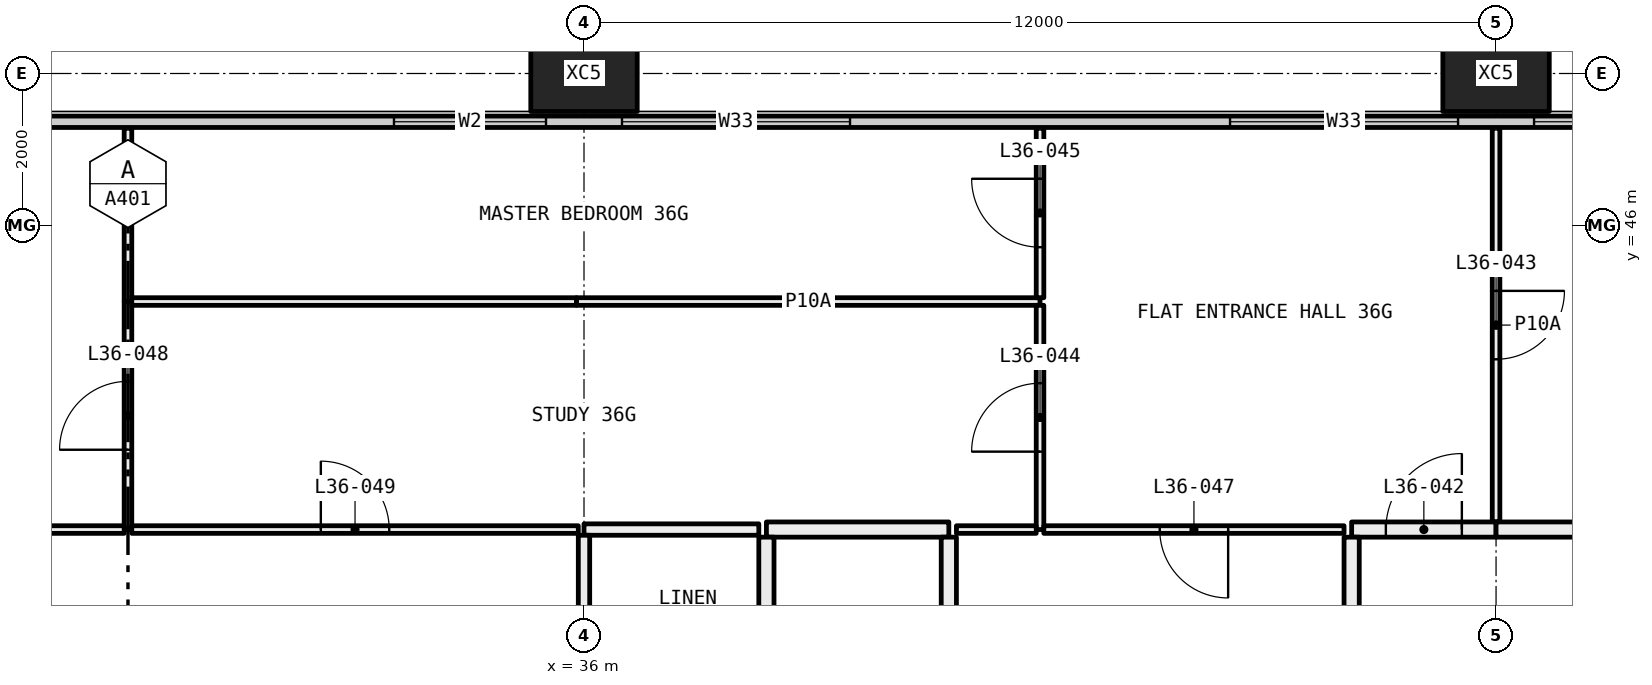
"""IFC4 building model, lengths in metres.
Left out: names, types, materials, properties, quantities, classifications, styles, units other than length and angle.
Written with IfcOpenShell. Run it as: python <this file> out.ifc"""

import sys

from ifc_helpers import new_model, si_unit, direction, frame, frame_2d, origin, origin_2d, place, context, subcontext, project, spatial, rectangle, hollow_rectangle, extrude, element, fill, save


model = new_model("IFC4")
c1 = context("Model", 3, precision=1e-05, world=origin(), true_north=direction((0.0, 1.0)))
c2 = subcontext(c1, "Body", "Model", "MODEL_VIEW")
j1 = project(units=[si_unit("LENGTHUNIT", "METRE"), si_unit("PLANEANGLEUNIT", "RADIAN")], contexts=[c1])
p1 = place(None, origin())
s1 = spatial("IfcSite", under=j1, at=p1, CompositionType="ELEMENT")
p2 = place(p1, origin())
s2 = spatial("IfcBuilding", under=s1, at=p2, CompositionType="ELEMENT")
p3 = place(p2, frame((0.0, 0.0, 138.0)))
s3 = spatial("IfcBuildingStorey", under=s2, at=p3, CompositionType="ELEMENT", Elevation=138.0)
for number, where, z_axis, x_axis in (
    (1, (36.0, 48.0, -0.4), (0.0, 0.0, 1.0), (1.0, 0.0, 0.0)),
    (2, (48.0, 48.0, -0.4), (0.0, 0.0, 1.0), (1.0, 0.0, 0.0)),
):
    element("IfcColumn", number, at=place(p3, frame(where, z_axis=z_axis, x_axis=x_axis)), inside=s3, PredefinedType="COLUMN", context=c2, shape_type="SweptSolid", body=[
        extrude(hollow_rectangle(XDim=1.4, YDim=1.0, WallThickness=0.055, at=origin_2d()), origin(), (0.0, 0.0, 1.0), 3.45),
    ])
p4 = place(p3, frame((6.56, 47.365, 0.0), z_axis=(0.0, 0.0, 1.0), x_axis=(1.0, 0.0, 0.0)))
e3 = element("IfcWall", 3, at=p4, inside=s3, PredefinedType="ELEMENTEDWALL", context=c2, shape_type="SweptSolid", body=[
    extrude(rectangle(XDim=58.88, YDim=0.15, at=frame_2d((29.44, 0.0))), origin(), (0.0, 0.0, 1.0), 3.05),
])
p5 = place(p4, frame((0.44, 0.0, 0.45)))
e4 = element("IfcOpeningElement", 4, at=p5, cuts=e3, PredefinedType="OPENING", context=c2, shape_type="SweptSolid", body=[
    extrude(rectangle(XDim=4.5, YDim=2.55, at=frame_2d((2.25, 1.275))), frame((0.0, 0.085, 0.0), z_axis=(0.0, -1.0, 0.0), x_axis=(1.0, 0.0, 0.0)), (0.0, 0.0, 1.0), 0.17),
])
p6 = place(p4, frame((5.94, 0.0, 0.45)))
e5 = element("IfcOpeningElement", 5, at=p6, cuts=e3, PredefinedType="OPENING", context=c2, shape_type="SweptSolid", body=[
    extrude(rectangle(XDim=3.0, YDim=2.55, at=frame_2d((1.5, 1.275))), frame((0.0, 0.085, 0.0), z_axis=(0.0, -1.0, 0.0), x_axis=(1.0, 0.0, 0.0)), (0.0, 0.0, 1.0), 0.17),
])
p7 = place(p4, frame((13.94, 0.0, 0.45)))
e6 = element("IfcOpeningElement", 6, at=p7, cuts=e3, PredefinedType="OPENING", context=c2, shape_type="SweptSolid", body=[
    extrude(rectangle(XDim=3.0, YDim=2.55, at=frame_2d((1.5, 1.275))), frame((0.0, 0.085, 0.0), z_axis=(0.0, -1.0, 0.0), x_axis=(1.0, 0.0, 0.0)), (0.0, 0.0, 1.0), 0.17),
])
p8 = place(p4, frame((17.94, 0.0, 0.45)))
e7 = element("IfcOpeningElement", 7, at=p8, cuts=e3, PredefinedType="OPENING", context=c2, shape_type="SweptSolid", body=[
    extrude(rectangle(XDim=3.0, YDim=2.55, at=frame_2d((1.5, 1.275))), frame((0.0, 0.085, 0.0), z_axis=(0.0, -1.0, 0.0), x_axis=(1.0, 0.0, 0.0)), (0.0, 0.0, 1.0), 0.17),
])
p9 = place(p4, frame((26.94, 0.0, 0.45)))
e8 = element("IfcOpeningElement", 8, at=p9, cuts=e3, PredefinedType="OPENING", context=c2, shape_type="SweptSolid", body=[
    extrude(rectangle(XDim=2.0, YDim=2.55, at=frame_2d((1.0, 1.275))), frame((0.0, 0.085, 0.0), z_axis=(0.0, -1.0, 0.0), x_axis=(1.0, 0.0, 0.0)), (0.0, 0.0, 1.0), 0.17),
])
p10 = place(p4, frame((29.94, 0.0, 0.45)))
e9 = element("IfcOpeningElement", 9, at=p10, cuts=e3, PredefinedType="OPENING", context=c2, shape_type="SweptSolid", body=[
    extrude(rectangle(XDim=3.0, YDim=2.55, at=frame_2d((1.5, 1.275))), frame((0.0, 0.085, 0.0), z_axis=(0.0, -1.0, 0.0), x_axis=(1.0, 0.0, 0.0)), (0.0, 0.0, 1.0), 0.17),
])
p11 = place(p4, frame((37.94, 0.0, 0.45)))
e10 = element("IfcOpeningElement", 10, at=p11, cuts=e3, PredefinedType="OPENING", context=c2, shape_type="SweptSolid", body=[
    extrude(rectangle(XDim=3.0, YDim=2.55, at=frame_2d((1.5, 1.275))), frame((0.0, 0.085, 0.0), z_axis=(0.0, -1.0, 0.0), x_axis=(1.0, 0.0, 0.0)), (0.0, 0.0, 1.0), 0.17),
])
p12 = place(p4, frame((41.94, 0.0, 0.45)))
e11 = element("IfcOpeningElement", 11, at=p12, cuts=e3, PredefinedType="OPENING", context=c2, shape_type="SweptSolid", body=[
    extrude(rectangle(XDim=3.0, YDim=2.55, at=frame_2d((1.5, 1.275))), frame((0.0, 0.085, 0.0), z_axis=(0.0, -1.0, 0.0), x_axis=(1.0, 0.0, 0.0)), (0.0, 0.0, 1.0), 0.17),
])
p13 = place(p4, frame((50.94, 0.0, 0.45)))
e12 = element("IfcOpeningElement", 12, at=p13, cuts=e3, PredefinedType="OPENING", context=c2, shape_type="SweptSolid", body=[
    extrude(rectangle(XDim=2.0, YDim=2.55, at=frame_2d((1.0, 1.275))), frame((0.0, 0.085, 0.0), z_axis=(0.0, -1.0, 0.0), x_axis=(1.0, 0.0, 0.0)), (0.0, 0.0, 1.0), 0.17),
])
p14 = place(p4, frame((53.94, 0.0, 0.45)))
e13 = element("IfcOpeningElement", 13, at=p14, cuts=e3, PredefinedType="OPENING", context=c2, shape_type="SweptSolid", body=[
    extrude(rectangle(XDim=4.5, YDim=2.55, at=frame_2d((2.25, 1.275))), frame((0.0, 0.085, 0.0), z_axis=(0.0, -1.0, 0.0), x_axis=(1.0, 0.0, 0.0)), (0.0, 0.0, 1.0), 0.17),
])
p15 = place(p3, frame((30.0, 42.0, 0.0), z_axis=(0.0, 0.0, 1.0), x_axis=(0.0, 1.0, 0.0)))
e14 = element("IfcWall", 14, at=p15, inside=s3, PredefinedType="PARTITIONING", context=c2, shape_type="SweptSolid", body=[
    extrude(rectangle(XDim=3.0, YDim=0.1, at=frame_2d((1.5, 0.0))), origin(), (0.0, 0.0, 1.0), 3.05),
])
p16 = place(p15, frame((1.05, 0.0, 0.0)))
e15 = element("IfcOpeningElement", 15, at=p16, cuts=e14, PredefinedType="OPENING", context=c2, shape_type="SweptSolid", body=[
    extrude(rectangle(XDim=0.9, YDim=2.1, at=frame_2d((0.45, 1.05))), frame((0.0, 0.06, 0.0), z_axis=(0.0, -1.0, 0.0), x_axis=(1.0, 0.0, 0.0)), (0.0, 0.0, 1.0), 0.12),
])
p17 = place(p3, frame((30.0, 45.0, 0.0), z_axis=(0.0, 0.0, 1.0), x_axis=(0.0, 1.0, 0.0)))
e16 = element("IfcWall", 16, at=p17, inside=s3, PredefinedType="PARTITIONING", context=c2, shape_type="SweptSolid", body=[
    extrude(rectangle(XDim=2.28, YDim=0.1, at=frame_2d((1.14, 0.0))), origin(), (0.0, 0.0, 1.0), 3.05),
])
p18 = place(p3, frame((26.0, 42.0, 0.0), z_axis=(0.0, 0.0, 1.0), x_axis=(1.0, 0.0, 0.0)))
e17 = element("IfcWall", 17, at=p18, inside=s3, PredefinedType="PARTITIONING", context=c2, shape_type="SweptSolid", body=[
    extrude(rectangle(XDim=3.95, YDim=0.1, at=frame_2d((1.975, 0.0))), origin(), (0.0, 0.0, 1.0), 3.05),
])
p19 = place(p3, frame((42.0, 45.0, 0.0), z_axis=(0.0, 0.0, 1.0), x_axis=(-1.0, 0.0, 0.0)))
e18 = element("IfcWall", 18, at=p19, inside=s3, PredefinedType="PARTITIONING", context=c2, shape_type="SweptSolid", body=[
    extrude(rectangle(XDim=6.1, YDim=0.1, at=frame_2d((3.05, 0.0))), origin(), (0.0, 0.0, 1.0), 2.45),
])
p20 = place(p3, frame((35.9, 45.0, 0.0), z_axis=(0.0, 0.0, 1.0), x_axis=(-1.0, 0.0, 0.0)))
e19 = element("IfcWall", 19, at=p20, inside=s3, PredefinedType="PARTITIONING", context=c2, shape_type="SweptSolid", body=[
    extrude(rectangle(XDim=5.85, YDim=0.1, at=frame_2d((2.925, 0.0))), origin(), (0.0, 0.0, 1.0), 3.05),
])
p21 = place(p3, frame((42.0, 42.0, 0.0), z_axis=(0.0, 0.0, 1.0), x_axis=(0.0, 1.0, 0.0)))
e20 = element("IfcWall", 20, at=p21, inside=s3, PredefinedType="PARTITIONING", context=c2, shape_type="SweptSolid", body=[
    extrude(rectangle(XDim=2.95, YDim=0.1, at=frame_2d((1.475, 0.0))), origin(), (0.0, 0.0, 1.0), 3.05),
])
p22 = place(p21, frame((1.025, 0.0, 0.0)))
e21 = element("IfcOpeningElement", 21, at=p22, cuts=e20, PredefinedType="OPENING", context=c2, shape_type="SweptSolid", body=[
    extrude(rectangle(XDim=0.9, YDim=2.1, at=frame_2d((0.45, 1.05))), frame((0.0, 0.06, 0.0), z_axis=(0.0, -1.0, 0.0), x_axis=(1.0, 0.0, 0.0)), (0.0, 0.0, 1.0), 0.12),
])
p23 = place(p3, frame((30.05, 42.0, 0.0), z_axis=(0.0, 0.0, 1.0), x_axis=(1.0, 0.0, 0.0)))
e22 = element("IfcWall", 22, at=p23, inside=s3, PredefinedType="PARTITIONING", context=c2, shape_type="SweptSolid", body=[
    extrude(rectangle(XDim=5.875, YDim=0.1, at=frame_2d((2.938, 0.0))), origin(), (0.0, 0.0, 1.0), 2.45),
])
p24 = place(p23, frame((2.488, 0.0, 0.0)))
e23 = element("IfcOpeningElement", 23, at=p24, cuts=e22, PredefinedType="OPENING", context=c2, shape_type="SweptSolid", body=[
    extrude(rectangle(XDim=0.9, YDim=2.1, at=frame_2d((0.45, 1.05))), frame((0.0, 0.06, 0.0), z_axis=(0.0, -1.0, 0.0), x_axis=(1.0, 0.0, 0.0)), (0.0, 0.0, 1.0), 0.12),
])
p25 = place(p3, frame((36.0, 42.0, 0.0), z_axis=(0.0, 0.0, 1.0), x_axis=(1.0, 0.0, 0.0)))
e24 = element("IfcWall", 24, at=p25, inside=s3, PredefinedType="PARTITIONING", context=c2, shape_type="SweptSolid", body=[
    extrude(rectangle(XDim=2.3, YDim=0.15, at=frame_2d((1.15, 0.0))), origin(), (0.0, 0.0, 1.0), 2.45),
])
p26 = place(p3, frame((40.9, 42.0, 0.0), z_axis=(0.0, 0.0, 1.0), x_axis=(1.0, 0.0, 0.0)))
e25 = element("IfcWall", 25, at=p26, inside=s3, PredefinedType="PARTITIONING", context=c2, shape_type="SweptSolid", body=[
    extrude(rectangle(XDim=1.05, YDim=0.1, at=frame_2d((0.525, 0.0))), origin(), (0.0, 0.0, 1.0), 3.05),
])
p27 = place(p3, frame((38.4, 42.0, 0.0), z_axis=(0.0, 0.0, 1.0), x_axis=(1.0, 0.0, 0.0)))
e26 = element("IfcWall", 26, at=p27, inside=s3, PredefinedType="PARTITIONING", context=c2, shape_type="SweptSolid", body=[
    extrude(rectangle(XDim=2.4, YDim=0.2, at=frame_2d((1.2, 0.0))), origin(), (0.0, 0.0, 1.0), 3.05),
])
p28 = place(p3, frame((42.0, 45.05, 0.0), z_axis=(0.0, 0.0, 1.0), x_axis=(0.0, 1.0, 0.0)))
e27 = element("IfcWall", 27, at=p28, inside=s3, PredefinedType="PARTITIONING", context=c2, shape_type="SweptSolid", body=[
    extrude(rectangle(XDim=2.23, YDim=0.1, at=frame_2d((1.115, 0.0))), origin(), (0.0, 0.0, 1.0), 3.05),
])
p29 = place(p28, frame((0.665, 0.0, 0.0)))
e28 = element("IfcOpeningElement", 28, at=p29, cuts=e27, PredefinedType="OPENING", context=c2, shape_type="SweptSolid", body=[
    extrude(rectangle(XDim=0.9, YDim=2.1, at=frame_2d((0.45, 1.05))), frame((0.0, 0.06, 0.0), z_axis=(0.0, -1.0, 0.0), x_axis=(1.0, 0.0, 0.0)), (0.0, 0.0, 1.0), 0.12),
])
p30 = place(p3, frame((48.0, 42.1, 0.0), z_axis=(0.0, 0.0, 1.0), x_axis=(0.0, 1.0, 0.0)))
e29 = element("IfcWall", 29, at=p30, inside=s3, PredefinedType="PARTITIONING", context=c2, shape_type="SweptSolid", body=[
    extrude(rectangle(XDim=5.18, YDim=0.1, at=frame_2d((2.59, 0.0))), origin(), (0.0, 0.0, 1.0), 3.05),
])
p31 = place(p30, frame((2.14, 0.0, 0.0)))
e30 = element("IfcOpeningElement", 30, at=p31, cuts=e29, PredefinedType="OPENING", context=c2, shape_type="SweptSolid", body=[
    extrude(rectangle(XDim=0.9, YDim=2.1, at=frame_2d((0.45, 1.05))), frame((0.0, 0.06, 0.0), z_axis=(0.0, -1.0, 0.0), x_axis=(1.0, 0.0, 0.0)), (0.0, 0.0, 1.0), 0.12),
])
p32 = place(p3, frame((42.05, 42.0, 0.0), z_axis=(0.0, 0.0, 1.0), x_axis=(1.0, 0.0, 0.0)))
e31 = element("IfcWall", 31, at=p32, inside=s3, PredefinedType="PARTITIONING", context=c2, shape_type="SweptSolid", body=[
    extrude(rectangle(XDim=3.95, YDim=0.1, at=frame_2d((1.975, 0.0))), origin(), (0.0, 0.0, 1.0), 3.05),
])
p33 = place(p32, frame((1.525, 0.0, 0.0)))
e32 = element("IfcOpeningElement", 32, at=p33, cuts=e31, PredefinedType="OPENING", context=c2, shape_type="SweptSolid", body=[
    extrude(rectangle(XDim=0.9, YDim=2.1, at=frame_2d((0.45, 1.05))), frame((0.0, 0.06, 0.0), z_axis=(0.0, -1.0, 0.0), x_axis=(1.0, 0.0, 0.0)), (0.0, 0.0, 1.0), 0.12),
])
p34 = place(p3, frame((46.1, 42.0, 0.0), z_axis=(0.0, 0.0, 1.0), x_axis=(1.0, 0.0, 0.0)))
e33 = element("IfcWall", 33, at=p34, inside=s3, PredefinedType="PARTITIONING", context=c2, shape_type="SweptSolid", body=[
    extrude(rectangle(XDim=1.9, YDim=0.2, at=frame_2d((0.95, 0.0))), origin(), (0.0, 0.0, 1.0), 3.05),
])
p35 = place(p34, frame((0.45, 0.0, 0.0)))
e34 = element("IfcOpeningElement", 34, at=p35, cuts=e33, PredefinedType="OPENING", context=c2, shape_type="SweptSolid", body=[
    extrude(rectangle(XDim=1.0, YDim=2.1, at=frame_2d((0.5, 1.05))), frame((0.0, 0.11, 0.0), z_axis=(0.0, -1.0, 0.0), x_axis=(1.0, 0.0, 0.0)), (0.0, 0.0, 1.0), 0.22),
])
p36 = place(p3, frame((48.0, 42.0, 0.0), z_axis=(0.0, 0.0, 1.0), x_axis=(1.0, 0.0, 0.0)))
e35 = element("IfcWall", 35, at=p36, inside=s3, PredefinedType="PARTITIONING", context=c2, shape_type="SweptSolid", body=[
    extrude(rectangle(XDim=12.0, YDim=0.2, at=frame_2d((6.0, 0.0))), origin(), (0.0, 0.0, 1.0), 3.05),
])
p37 = place(p3, frame((36.0, 37.95, 0.0), z_axis=(0.0, 0.0, 1.0), x_axis=(0.0, 1.0, 0.0)))
e36 = element("IfcWall", 36, at=p37, inside=s3, PredefinedType="PARTITIONING", context=c2, shape_type="SweptSolid", body=[
    extrude(rectangle(XDim=3.975, YDim=0.15, at=frame_2d((1.988, 0.0))), origin(), (0.0, 0.0, 1.0), 2.45),
])
p38 = place(p37, frame((1.538, 0.0, 0.0)))
e37 = element("IfcOpeningElement", 37, at=p38, cuts=e36, PredefinedType="OPENING", context=c2, shape_type="SweptSolid", body=[
    extrude(rectangle(XDim=0.9, YDim=2.1, at=frame_2d((0.45, 1.05))), frame((0.0, 0.085, 0.0), z_axis=(0.0, -1.0, 0.0), x_axis=(1.0, 0.0, 0.0)), (0.0, 0.0, 1.0), 0.17),
])
p39 = place(p3, frame((38.4, 37.95, 0.0), z_axis=(0.0, 0.0, 1.0), x_axis=(0.0, 1.0, 0.0)))
e38 = element("IfcWall", 38, at=p39, inside=s3, PredefinedType="PARTITIONING", context=c2, shape_type="SweptSolid", body=[
    extrude(rectangle(XDim=3.95, YDim=0.2, at=frame_2d((1.975, 0.0))), origin(), (0.0, 0.0, 1.0), 3.05),
])
p40 = place(p3, frame((40.8, 41.9, 0.0), z_axis=(0.0, 0.0, 1.0), x_axis=(0.0, -1.0, 0.0)))
e39 = element("IfcWall", 39, at=p40, inside=s3, PredefinedType="PARTITIONING", context=c2, shape_type="SweptSolid", body=[
    extrude(rectangle(XDim=6.2, YDim=0.2, at=frame_2d((3.1, 0.0))), origin(), (0.0, 0.0, 1.0), 2.45),
])
p41 = place(p3, frame((46.1, 36.1, 0.0), z_axis=(0.0, 0.0, 1.0), x_axis=(0.0, 1.0, 0.0)))
e40 = element("IfcWall", 40, at=p41, inside=s3, PredefinedType="PARTITIONING", context=c2, shape_type="SweptSolid", body=[
    extrude(rectangle(XDim=5.8, YDim=0.2, at=frame_2d((2.9, 0.0))), origin(), (0.0, 0.0, 1.0), 3.05),
])
p42 = place(p9, origin())
e41 = element("IfcWindow", 41, at=p42, inside=s3, PartitioningType="SINGLE_PANEL", PredefinedType="WINDOW", context=c2, shape_type="SweptSolid", body=[
    extrude(rectangle(XDim=2.0, YDim=2.55, at=frame_2d((1.0, 1.275))), frame((0.0, 0.03, 0.0), z_axis=(0.0, -1.0, 0.0), x_axis=(1.0, 0.0, 0.0)), (0.0, 0.0, 1.0), 0.06),
])
fill(e8, e41)
p43 = place(p10, origin())
e42 = element("IfcWindow", 42, at=p43, inside=s3, PartitioningType="SINGLE_PANEL", PredefinedType="WINDOW", context=c2, shape_type="SweptSolid", body=[
    extrude(rectangle(XDim=3.0, YDim=2.55, at=frame_2d((1.5, 1.275))), frame((0.0, 0.03, 0.0), z_axis=(0.0, -1.0, 0.0), x_axis=(1.0, 0.0, 0.0)), (0.0, 0.0, 1.0), 0.06),
])
fill(e9, e42)
p44 = place(p11, origin())
e43 = element("IfcWindow", 43, at=p44, inside=s3, PartitioningType="SINGLE_PANEL", PredefinedType="WINDOW", context=c2, shape_type="SweptSolid", body=[
    extrude(rectangle(XDim=3.0, YDim=2.55, at=frame_2d((1.5, 1.275))), frame((0.0, 0.03, 0.0), z_axis=(0.0, -1.0, 0.0), x_axis=(1.0, 0.0, 0.0)), (0.0, 0.0, 1.0), 0.06),
])
fill(e10, e43)
p45 = place(p12, origin())
e44 = element("IfcWindow", 44, at=p45, inside=s3, PartitioningType="SINGLE_PANEL", PredefinedType="WINDOW", context=c2, shape_type="SweptSolid", body=[
    extrude(rectangle(XDim=3.0, YDim=2.55, at=frame_2d((1.5, 1.275))), frame((0.0, 0.03, 0.0), z_axis=(0.0, -1.0, 0.0), x_axis=(1.0, 0.0, 0.0)), (0.0, 0.0, 1.0), 0.06),
])
fill(e11, e44)
p46 = place(p35, origin())
e45 = element("IfcDoor", 45, at=p46, inside=s3, OperationType="SINGLE_SWING_LEFT", PredefinedType="DOOR", context=c2, shape_type="SweptSolid", body=[
    extrude(rectangle(XDim=1.0, YDim=2.1, at=frame_2d((0.5, 1.05))), frame((0.0, 0.025, 0.0), z_axis=(0.0, -1.0, 0.0), x_axis=(1.0, 0.0, 0.0)), (0.0, 0.0, 1.0), 0.05),
])
fill(e34, e45)
p47 = place(p31, frame((0.9, 0.0, 0.0), x_axis=(-1.0, 0.0, 0.0)))
e46 = element("IfcDoor", 46, at=p47, inside=s3, OperationType="SINGLE_SWING_RIGHT", PredefinedType="DOOR", context=c2, shape_type="SweptSolid", body=[
    extrude(rectangle(XDim=0.9, YDim=2.1, at=frame_2d((0.45, 1.05))), frame((0.0, 0.025, 0.0), z_axis=(0.0, -1.0, 0.0), x_axis=(1.0, 0.0, 0.0)), (0.0, 0.0, 1.0), 0.05),
])
fill(e30, e46)
p48 = place(p22, origin())
e47 = element("IfcDoor", 47, at=p48, inside=s3, OperationType="SINGLE_SWING_RIGHT", PredefinedType="DOOR", context=c2, shape_type="SweptSolid", body=[
    extrude(rectangle(XDim=0.9, YDim=2.1, at=frame_2d((0.45, 1.05))), frame((0.0, 0.025, 0.0), z_axis=(0.0, -1.0, 0.0), x_axis=(1.0, 0.0, 0.0)), (0.0, 0.0, 1.0), 0.05),
])
fill(e21, e47)
p49 = place(p29, origin())
e48 = element("IfcDoor", 48, at=p49, inside=s3, OperationType="SINGLE_SWING_LEFT", PredefinedType="DOOR", context=c2, shape_type="SweptSolid", body=[
    extrude(rectangle(XDim=0.9, YDim=2.1, at=frame_2d((0.45, 1.05))), frame((0.0, 0.025, 0.0), z_axis=(0.0, -1.0, 0.0), x_axis=(1.0, 0.0, 0.0)), (0.0, 0.0, 1.0), 0.05),
])
fill(e28, e48)
p50 = place(p33, frame((0.9, 0.0, 0.0), x_axis=(-1.0, 0.0, 0.0)))
e49 = element("IfcDoor", 49, at=p50, inside=s3, OperationType="SINGLE_SWING_RIGHT", PredefinedType="DOOR", context=c2, shape_type="SweptSolid", body=[
    extrude(rectangle(XDim=0.9, YDim=2.1, at=frame_2d((0.45, 1.05))), frame((0.0, 0.025, 0.0), z_axis=(0.0, -1.0, 0.0), x_axis=(1.0, 0.0, 0.0)), (0.0, 0.0, 1.0), 0.05),
])
fill(e32, e49)
p51 = place(p16, origin())
e50 = element("IfcDoor", 50, at=p51, inside=s3, OperationType="SINGLE_SWING_RIGHT", PredefinedType="DOOR", context=c2, shape_type="SweptSolid", body=[
    extrude(rectangle(XDim=0.9, YDim=2.1, at=frame_2d((0.45, 1.05))), frame((0.0, 0.025, 0.0), z_axis=(0.0, -1.0, 0.0), x_axis=(1.0, 0.0, 0.0)), (0.0, 0.0, 1.0), 0.05),
])
fill(e15, e50)
p52 = place(p24, origin())
e51 = element("IfcDoor", 51, at=p52, inside=s3, OperationType="SINGLE_SWING_RIGHT", PredefinedType="DOOR", context=c2, shape_type="SweptSolid", body=[
    extrude(rectangle(XDim=0.9, YDim=2.1, at=frame_2d((0.45, 1.05))), frame((0.0, 0.025, 0.0), z_axis=(0.0, -1.0, 0.0), x_axis=(1.0, 0.0, 0.0)), (0.0, 0.0, 1.0), 0.05),
])
fill(e23, e51)
save(model, sys.argv[1])
